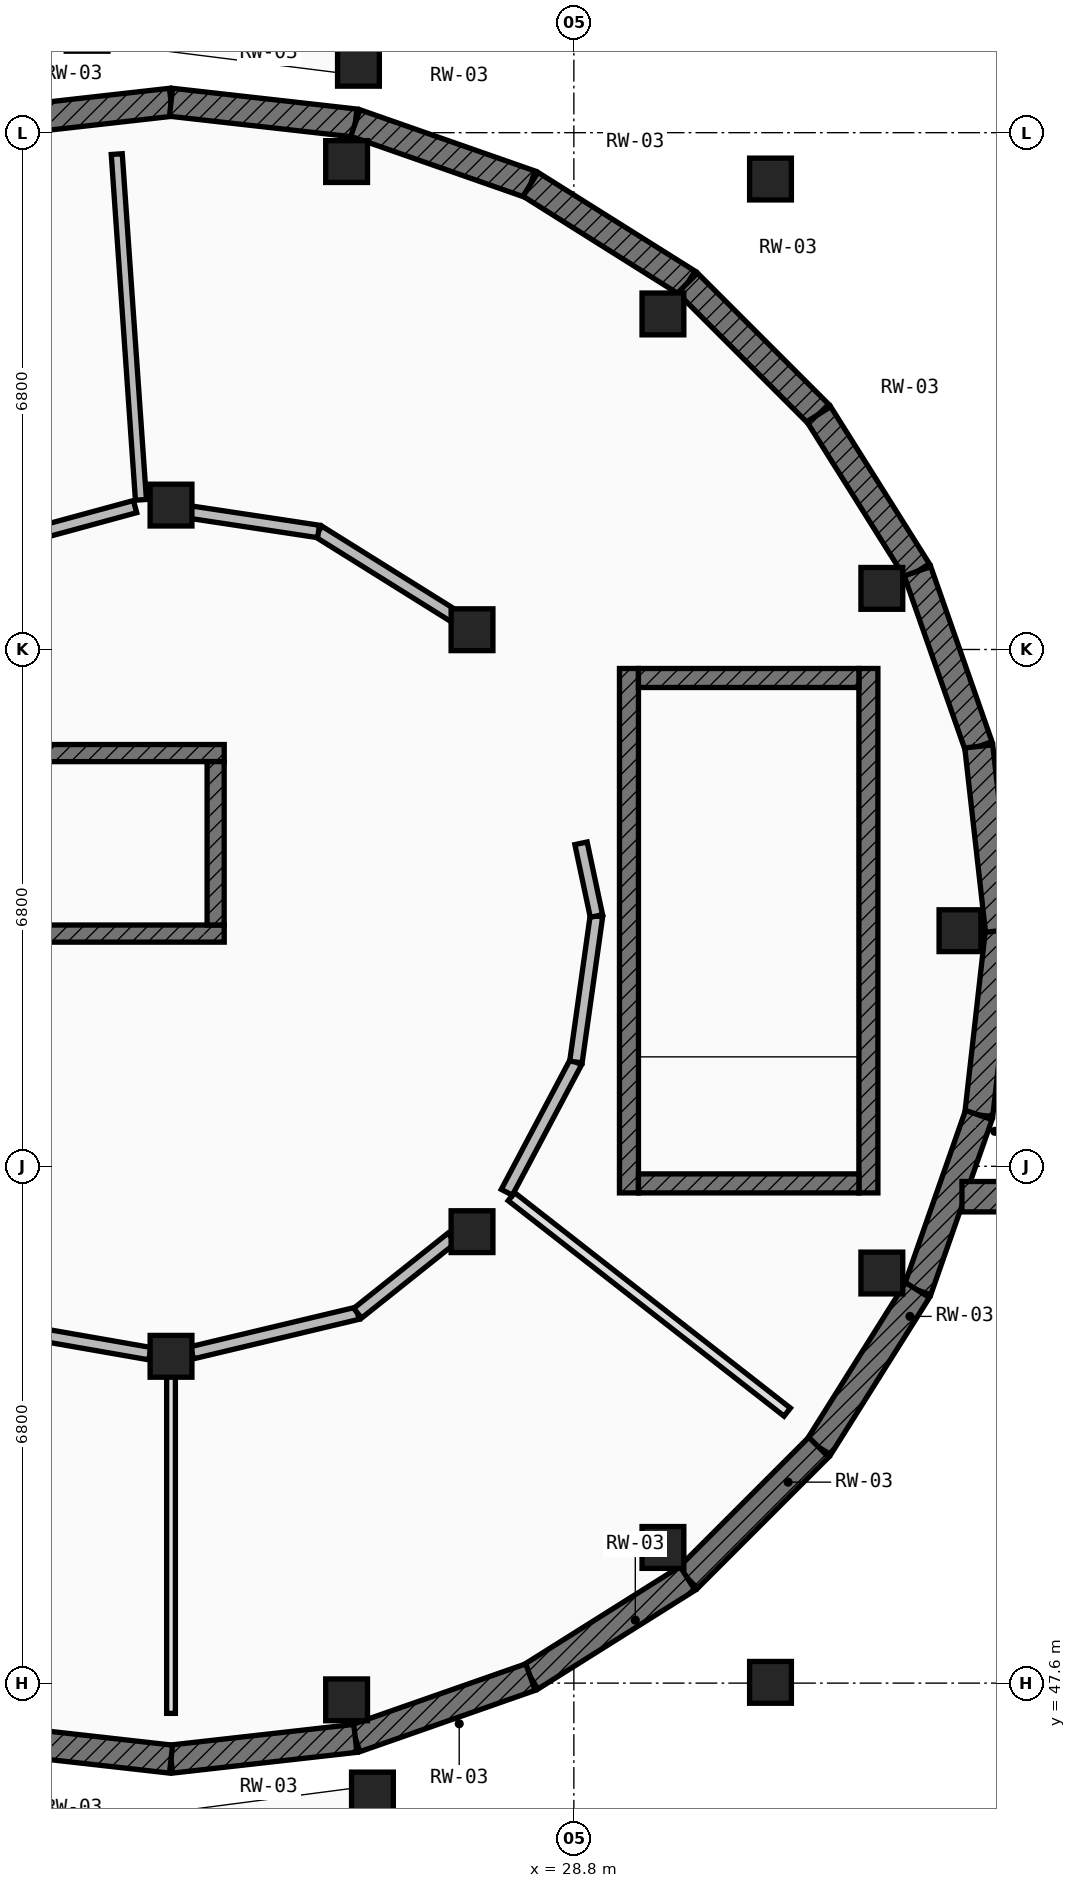
"""IFC4 building model, lengths in metres.
Left out: names, types, materials, properties, quantities, classifications, styles, units other than length and angle.
Written with IfcOpenShell. Run it as: python <this file> out.ifc"""

import sys

from ifc_helpers import new_model, si_unit, direction, frame, frame_2d, origin, origin_2d, place, context, subcontext, project, spatial, rectangle, extrude, element, fill, save


model = new_model("IFC4")
c1 = context("Model", 3, precision=1e-05, world=origin(), true_north=direction((0.0, 1.0)))
c2 = subcontext(c1, "Body", "Model", "MODEL_VIEW")
j1 = project(units=[si_unit("LENGTHUNIT", "METRE"), si_unit("PLANEANGLEUNIT", "RADIAN")], contexts=[c1])
p1 = place(None, origin())
s1 = spatial("IfcSite", under=j1, at=p1, CompositionType="ELEMENT")
p2 = place(p1, origin())
s2 = spatial("IfcBuilding", under=s1, at=p2, CompositionType="ELEMENT")
p3 = place(p2, frame((0.0, 0.0, -4.55)))
s3 = spatial("IfcBuildingStorey", under=s2, at=p3, CompositionType="ELEMENT", Elevation=-4.55)
for number, where, z_axis, x_axis in (
    (1, (33.88, 57.5, 0.0), (0.0, 0.0, 1.0), (1.0, 0.0, 0.0)),
    (2, (32.852, 62.004, 0.0), (0.0, 0.0, 1.0), (1.0, 0.0, 0.0)),
    (3, (29.972, 65.615, 0.0), (0.0, 0.0, 1.0), (1.0, 0.0, 0.0)),
    (4, (25.81, 67.62, 0.0), (0.0, 0.0, 1.0), (1.0, 0.0, 0.0)),
    (5, (25.81, 47.38, 0.0), (0.0, 0.0, 1.0), (1.0, 0.0, 0.0)),
    (6, (29.972, 49.385, 0.0), (0.0, 0.0, 1.0), (1.0, 0.0, 0.0)),
    (7, (32.852, 52.996, 0.0), (0.0, 0.0, 1.0), (1.0, 0.0, 0.0)),
    (8, (27.46, 61.46, 0.0), (0.0, 0.0, 1.0), (1.0, 0.0, 0.0)),
    (9, (23.5, 63.1, 0.0), (0.0, 0.0, 1.0), (1.0, 0.0, 0.0)),
    (10, (23.5, 51.9, 0.0), (0.0, 0.0, 1.0), (1.0, 0.0, 0.0)),
    (11, (27.46, 53.54, 0.0), (0.0, 0.0, 1.0), (1.0, 0.0, 0.0)),
    (12, (26.15, 46.154, 0.0), (0.0, 0.0, 1.0), (1.0, 0.0, 0.0)),
    (13, (25.966, 68.887, 0.0), (0.0, 0.0, 1.0), (1.0, 0.0, 0.0)),
):
    element("IfcColumn", number, at=place(p3, frame(where, z_axis=z_axis, x_axis=x_axis)), inside=s3, PredefinedType="COLUMN", context=c2, shape_type="SweptSolid", body=[
        extrude(rectangle(XDim=0.55, YDim=0.55, at=origin_2d()), origin(), (0.0, 0.0, 1.0), 4.55),
    ])
for number, where, z_axis, x_axis in (
    (14, (31.387, 67.39, 0.0), (0.0, 0.0, 1.0), (1.0, 0.0, 0.0)),
    (15, (31.387, 47.61, 0.0), (0.0, 0.0, 1.0), (1.0, 0.0, 0.0)),
):
    element("IfcColumn", number, at=place(p3, frame(where, z_axis=z_axis, x_axis=x_axis)), inside=s3, PredefinedType="COLUMN", context=c2, shape_type="SweptSolid", body=[
        extrude(rectangle(XDim=0.55, YDim=0.55, at=origin_2d()), origin(), (0.0, 0.0, 1.0), 5.7),
    ])
p4 = place(p3, frame((34.4, 57.5, 0.0), z_axis=(0.0, 0.0, 1.0), x_axis=(-0.111847873866, -0.993725340882, 0.0)))
e16 = element("IfcWall", 16, at=p4, inside=s3, PredefinedType="USERDEFINED", context=c2, shape_type="SweptSolid", body=[
    extrude(rectangle(XDim=2.44, YDim=0.37, at=frame_2d((1.22, 0.0))), origin(), (0.0, 0.0, 1.0), 3.335),
])
p5 = place(p3, frame((34.127, 55.075, 0.0), z_axis=(0.0, 0.0, 1.0), x_axis=(-0.330176659411, -0.943919156274, 0.0)))
e17 = element("IfcWall", 17, at=p5, inside=s3, PredefinedType="USERDEFINED", context=c2, shape_type="SweptSolid", body=[
    extrude(rectangle(XDim=2.441, YDim=0.37, at=frame_2d((1.22, 0.0))), origin(), (0.0, 0.0, 1.0), 3.335),
])
p6 = place(p3, frame((33.321, 52.771, 0.0), z_axis=(0.0, 0.0, 1.0), x_axis=(-0.532136726684, -0.846658434148, 0.0)))
e18 = element("IfcWall", 18, at=p6, inside=s3, PredefinedType="USERDEFINED", context=c2, shape_type="SweptSolid", body=[
    extrude(rectangle(XDim=2.441, YDim=0.37, at=frame_2d((1.221, 0.0))), origin(), (0.0, 0.0, 1.0), 3.335),
])
p7 = place(p3, frame((32.022, 50.704, 0.0), z_axis=(0.0, 0.0, 1.0), x_axis=(-0.707106781187, -0.707106781187, 0.0)))
e19 = element("IfcWall", 19, at=p7, inside=s3, PredefinedType="USERDEFINED", context=c2, shape_type="SweptSolid", body=[
    extrude(rectangle(XDim=2.441, YDim=0.37, at=frame_2d((1.22, 0.0))), origin(), (0.0, 0.0, 1.0), 3.335),
])
p8 = place(p3, frame((30.296, 48.978, 0.0), z_axis=(0.0, 0.0, 1.0), x_axis=(-0.846658434148, -0.532136726684, 0.0)))
e20 = element("IfcWall", 20, at=p8, inside=s3, PredefinedType="USERDEFINED", context=c2, shape_type="SweptSolid", body=[
    extrude(rectangle(XDim=2.441, YDim=0.37, at=frame_2d((1.221, 0.0))), origin(), (0.0, 0.0, 1.0), 3.335),
])
p9 = place(p3, frame((28.229, 47.679, 0.0), z_axis=(0.0, 0.0, 1.0), x_axis=(-0.943919156274, -0.330176659411, 0.0)))
e21 = element("IfcWall", 21, at=p9, inside=s3, PredefinedType="USERDEFINED", context=c2, shape_type="SweptSolid", body=[
    extrude(rectangle(XDim=2.441, YDim=0.37, at=frame_2d((1.22, 0.0))), origin(), (0.0, 0.0, 1.0), 3.335),
])
for number, where, z_axis, x_axis in (
    (22, (25.925, 46.873, 0.0), (0.0, 0.0, 1.0), (-0.994, -0.112, 0.0)),
    (23, (23.5, 46.6, 0.0), (0.0, 0.0, 1.0), (-0.994, 0.112, 0.0)),
    (24, (21.075, 68.127, 0.0), (0.0, 0.0, 1.0), (0.994, 0.112, 0.0)),
    (25, (23.5, 68.4, 0.0), (0.0, 0.0, 1.0), (0.994, -0.112, 0.0)),
):
    element("IfcWall", number, at=place(p3, frame(where, z_axis=z_axis, x_axis=x_axis)), inside=s3, PredefinedType="USERDEFINED", context=c2, shape_type="SweptSolid", body=[
        extrude(rectangle(XDim=2.44, YDim=0.37, at=frame_2d((1.22, 0.0))), origin(), (0.0, 0.0, 1.0), 3.335),
    ])
p10 = place(p3, frame((25.925, 68.127, 0.0), z_axis=(0.0, 0.0, 1.0), x_axis=(0.943919156274, -0.330176659411, 0.0)))
e26 = element("IfcWall", 26, at=p10, inside=s3, PredefinedType="USERDEFINED", context=c2, shape_type="SweptSolid", body=[
    extrude(rectangle(XDim=2.441, YDim=0.37, at=frame_2d((1.22, 0.0))), origin(), (0.0, 0.0, 1.0), 3.335),
])
p11 = place(p3, frame((28.229, 67.321, 0.0), z_axis=(0.0, 0.0, 1.0), x_axis=(0.846658434148, -0.532136726684, 0.0)))
e27 = element("IfcWall", 27, at=p11, inside=s3, PredefinedType="USERDEFINED", context=c2, shape_type="SweptSolid", body=[
    extrude(rectangle(XDim=2.441, YDim=0.37, at=frame_2d((1.221, 0.0))), origin(), (0.0, 0.0, 1.0), 3.335),
])
p12 = place(p3, frame((30.296, 66.022, 0.0), z_axis=(0.0, 0.0, 1.0), x_axis=(0.707106781187, -0.707106781187, 0.0)))
e28 = element("IfcWall", 28, at=p12, inside=s3, PredefinedType="USERDEFINED", context=c2, shape_type="SweptSolid", body=[
    extrude(rectangle(XDim=2.441, YDim=0.37, at=frame_2d((1.22, 0.0))), origin(), (0.0, 0.0, 1.0), 3.335),
])
p13 = place(p3, frame((32.022, 64.296, 0.0), z_axis=(0.0, 0.0, 1.0), x_axis=(0.532136726684, -0.846658434148, 0.0)))
e29 = element("IfcWall", 29, at=p13, inside=s3, PredefinedType="USERDEFINED", context=c2, shape_type="SweptSolid", body=[
    extrude(rectangle(XDim=2.441, YDim=0.37, at=frame_2d((1.221, 0.0))), origin(), (0.0, 0.0, 1.0), 3.335),
])
p14 = place(p3, frame((33.321, 62.229, 0.0), z_axis=(0.0, 0.0, 1.0), x_axis=(0.330176659411, -0.943919156274, 0.0)))
e30 = element("IfcWall", 30, at=p14, inside=s3, PredefinedType="USERDEFINED", context=c2, shape_type="SweptSolid", body=[
    extrude(rectangle(XDim=2.441, YDim=0.37, at=frame_2d((1.22, 0.0))), origin(), (0.0, 0.0, 1.0), 3.335),
])
p15 = place(p3, frame((34.127, 59.925, 0.0), z_axis=(0.0, 0.0, 1.0), x_axis=(0.111847873866, -0.993725340882, 0.0)))
e31 = element("IfcWall", 31, at=p15, inside=s3, PredefinedType="USERDEFINED", context=c2, shape_type="SweptSolid", body=[
    extrude(rectangle(XDim=2.44, YDim=0.37, at=frame_2d((1.22, 0.0))), origin(), (0.0, 0.0, 1.0), 3.335),
])
p16 = place(p3, frame((33.906, 54.0, 0.0), z_axis=(0.0, 0.0, 1.0), x_axis=(1.0, 0.0, 0.0)))
e32 = element("IfcWall", 32, at=p16, inside=s3, PredefinedType="USERDEFINED", context=c2, shape_type="SweptSolid", body=[
    extrude(rectangle(XDim=5.27, YDim=0.4, at=frame_2d((2.635, 0.0))), origin(), (0.0, 0.0, 1.0), 6.68),
])
p17 = place(p3, frame((29.525, 60.95, 0.0), z_axis=(0.0, 0.0, 1.0), x_axis=(0.0, -1.0, 0.0)))
e33 = element("IfcWall", 33, at=p17, inside=s3, PredefinedType="SHEAR", context=c2, shape_type="SweptSolid", body=[
    extrude(rectangle(XDim=6.9, YDim=0.25, at=frame_2d((3.45, 0.0))), origin(), (0.0, 0.0, 1.0), 4.135),
])
p18 = place(p17, frame((0.43, 0.0, 0.0)))
e34 = element("IfcOpeningElement", 34, at=p18, cuts=e33, PredefinedType="OPENING", context=c2, shape_type="SweptSolid", body=[
    extrude(rectangle(XDim=1.1, YDim=2.15, at=frame_2d((0.55, 1.075))), frame((0.0, 0.135, 0.0), z_axis=(0.0, -1.0, 0.0), x_axis=(1.0, 0.0, 0.0)), (0.0, 0.0, 1.0), 0.27),
])
p19 = place(p3, frame((32.675, 60.95, 0.0), z_axis=(0.0, 0.0, 1.0), x_axis=(0.0, -1.0, 0.0)))
e35 = element("IfcWall", 35, at=p19, inside=s3, PredefinedType="SHEAR", context=c2, shape_type="SweptSolid", body=[
    extrude(rectangle(XDim=6.9, YDim=0.25, at=frame_2d((3.45, 0.0))), origin(), (0.0, 0.0, 1.0), 4.135),
])
for number, where, z_axis, x_axis in (
    (36, (29.65, 60.825, 0.0), (0.0, 0.0, 1.0), (1.0, 0.0, 0.0)),
    (37, (29.65, 54.175, 0.0), (0.0, 0.0, 1.0), (1.0, 0.0, 0.0)),
):
    element("IfcWall", number, at=place(p3, frame(where, z_axis=z_axis, x_axis=x_axis)), inside=s3, PredefinedType="SHEAR", context=c2, shape_type="SweptSolid", body=[
        extrude(rectangle(XDim=2.9, YDim=0.25, at=frame_2d((1.45, 0.0))), origin(), (0.0, 0.0, 1.0), 4.135),
    ])
p20 = place(p3, frame((21.1, 57.462, 0.0), z_axis=(0.0, 0.0, 1.0), x_axis=(1.0, 0.0, 0.0)))
e38 = element("IfcWall", 38, at=p20, inside=s3, PredefinedType="SHEAR", context=c2, shape_type="SweptSolid", body=[
    extrude(rectangle(XDim=3.1, YDim=0.225, at=frame_2d((1.55, 0.0))), origin(), (0.0, 0.0, 1.0), 4.135),
])
p21 = place(p20, frame((0.95, 0.0, 0.0)))
e39 = element("IfcOpeningElement", 39, at=p21, cuts=e38, PredefinedType="OPENING", context=c2, shape_type="SweptSolid", body=[
    extrude(rectangle(XDim=1.2, YDim=2.2, at=frame_2d((0.6, 1.1))), frame((0.0, 0.123, 0.0), z_axis=(0.0, -1.0, 0.0), x_axis=(1.0, 0.0, 0.0)), (0.0, 0.0, 1.0), 0.245),
])
p22 = place(p3, frame((21.1, 59.837, 0.0), z_axis=(0.0, 0.0, 1.0), x_axis=(1.0, 0.0, 0.0)))
e40 = element("IfcWall", 40, at=p22, inside=s3, PredefinedType="SHEAR", context=c2, shape_type="SweptSolid", body=[
    extrude(rectangle(XDim=3.1, YDim=0.225, at=frame_2d((1.55, 0.0))), origin(), (0.0, 0.0, 1.0), 4.135),
])
p23 = place(p3, frame((24.087, 57.575, 0.0), z_axis=(0.0, 0.0, 1.0), x_axis=(0.0, 1.0, 0.0)))
e41 = element("IfcWall", 41, at=p23, inside=s3, PredefinedType="SHEAR", context=c2, shape_type="SweptSolid", body=[
    extrude(rectangle(XDim=2.15, YDim=0.225, at=frame_2d((1.075, 0.0))), origin(), (0.0, 0.0, 1.0), 4.135),
])
p24 = place(p3, frame((23.104, 63.169, 0.0), z_axis=(0.0, 0.0, 1.0), x_axis=(-0.069759335413, 0.997563850148, 0.0)))
e42 = element("IfcWall", 42, at=p24, inside=s3, PredefinedType="PARTITIONING", context=c2, shape_type="SweptSolid", body=[
    extrude(rectangle(XDim=4.56, YDim=0.145, at=frame_2d((2.28, 0.0))), origin(), (0.0, 0.0, 1.0), 3.31),
])
p25 = place(p3, frame((23.5, 51.817, 0.0), z_axis=(0.0, 0.0, 1.0), x_axis=(0.0, -1.0, 0.0)))
e43 = element("IfcWall", 43, at=p25, inside=s3, PredefinedType="PARTITIONING", context=c2, shape_type="SweptSolid", body=[
    extrude(rectangle(XDim=4.615, YDim=0.115, at=frame_2d((2.308, 0.0))), origin(), (0.0, 0.0, 1.0), 3.31),
])
p26 = place(p3, frame((27.978, 54.001, 0.0), z_axis=(0.0, 0.0, 1.0), x_axis=(0.788037233831, -0.615627580681, 0.0)))
e44 = element("IfcWall", 44, at=p26, inside=s3, PredefinedType="PLUMBINGWALL", context=c2, shape_type="SweptSolid", body=[
    extrude(rectangle(XDim=4.605, YDim=0.135, at=frame_2d((2.302, 0.0))), origin(), (0.0, 0.0, 1.0), 3.31),
])
p27 = place(p3, frame((27.238, 61.63, 0.0), z_axis=(0.0, 0.0, 1.0), x_axis=(-0.848030663633, 0.529947161081, 0.0)))
e45 = element("IfcWall", 45, at=p27, inside=s3, PredefinedType="PARTITIONING", context=c2, shape_type="SweptSolid", body=[
    extrude(rectangle(XDim=2.119, YDim=0.165, at=frame_2d((1.06, 0.0))), origin(), (0.0, 0.0, 1.0), 3.31),
])
p28 = place(p27, frame((0.469, 0.0, 0.0)))
e46 = element("IfcOpeningElement", 46, at=p28, cuts=e45, PredefinedType="OPENING", context=c2, shape_type="SweptSolid", body=[
    extrude(rectangle(XDim=1.18, YDim=2.2, at=frame_2d((0.59, 1.1))), frame((0.0, 0.093, 0.0), z_axis=(0.0, -1.0, 0.0), x_axis=(1.0, 0.0, 0.0)), (0.0, 0.0, 1.0), 0.185),
])
p29 = place(p3, frame((25.441, 62.753, 0.0), z_axis=(0.0, 0.0, 1.0), x_axis=(-0.988808298797, 0.149191649331, 0.0)))
e47 = element("IfcWall", 47, at=p29, inside=s3, PredefinedType="PARTITIONING", context=c2, shape_type="SweptSolid", body=[
    extrude(rectangle(XDim=1.697, YDim=0.165, at=frame_2d((0.849, 0.0))), origin(), (0.0, 0.0, 1.0), 3.31),
])
p30 = place(p3, frame((23.027, 63.08, 0.0), z_axis=(0.0, 0.0, 1.0), x_axis=(-0.964919932979, -0.262544325667, 0.0)))
e48 = element("IfcWall", 48, at=p30, inside=s3, PredefinedType="PARTITIONING", context=c2, shape_type="SweptSolid", body=[
    extrude(rectangle(XDim=2.019, YDim=0.165, at=frame_2d((1.009, 0.0))), origin(), (0.0, 0.0, 1.0), 3.31),
])
p31 = place(p30, frame((0.389, 0.0, 0.0)))
e49 = element("IfcOpeningElement", 49, at=p31, cuts=e48, PredefinedType="OPENING", context=c2, shape_type="SweptSolid", body=[
    extrude(rectangle(XDim=1.24, YDim=2.22, at=frame_2d((0.62, 1.11))), frame((0.0, 0.093, 0.0), z_axis=(0.0, -1.0, 0.0), x_axis=(1.0, 0.0, 0.0)), (0.0, 0.0, 1.0), 0.185),
])
p32 = place(p3, frame((21.681, 52.204, 0.0), z_axis=(0.0, 0.0, 1.0), x_axis=(0.985099289187, -0.171986599601, 0.0)))
e50 = element("IfcWall", 50, at=p32, inside=s3, PredefinedType="PARTITIONING", context=c2, shape_type="SweptSolid", body=[
    extrude(rectangle(XDim=1.564, YDim=0.165, at=frame_2d((0.782, 0.0))), origin(), (0.0, 0.0, 1.0), 3.31),
])
p33 = place(p3, frame((23.776, 51.947, 0.0), z_axis=(0.0, 0.0, 1.0), x_axis=(0.972689167377, 0.232111575903, 0.0)))
e51 = element("IfcWall", 51, at=p33, inside=s3, PredefinedType="PARTITIONING", context=c2, shape_type="SweptSolid", body=[
    extrude(rectangle(XDim=2.24, YDim=0.165, at=frame_2d((1.12, 0.0))), origin(), (0.0, 0.0, 1.0), 3.31),
])
p34 = place(p33, frame((0.68, 0.0, 0.0)))
e52 = element("IfcOpeningElement", 52, at=p34, cuts=e51, PredefinedType="OPENING", context=c2, shape_type="SweptSolid", body=[
    extrude(rectangle(XDim=0.88, YDim=2.1, at=frame_2d((0.44, 1.05))), frame((0.0, 0.093, 0.0), z_axis=(0.0, -1.0, 0.0), x_axis=(1.0, 0.0, 0.0)), (0.0, 0.0, 1.0), 0.185),
])
p35 = place(p3, frame((25.955, 52.467, 0.0), z_axis=(0.0, 0.0, 1.0), x_axis=(0.781844808281, 0.623473091451, 0.0)))
e53 = element("IfcWall", 53, at=p35, inside=s3, PredefinedType="PARTITIONING", context=c2, shape_type="SweptSolid", body=[
    extrude(rectangle(XDim=1.585, YDim=0.165, at=frame_2d((0.792, 0.0))), origin(), (0.0, 0.0, 1.0), 3.31),
])
p36 = place(p3, frame((27.918, 54.058, 0.0), z_axis=(0.0, 0.0, 1.0), x_axis=(0.46852941816, 0.883447895644, 0.0)))
e54 = element("IfcWall", 54, at=p36, inside=s3, PredefinedType="PARTITIONING", context=c2, shape_type="SweptSolid", body=[
    extrude(rectangle(XDim=1.94, YDim=0.165, at=frame_2d((0.97, 0.0))), origin(), (0.0, 0.0, 1.0), 3.31),
])
p37 = place(p36, frame((0.48, 0.0, 0.0)))
e55 = element("IfcOpeningElement", 55, at=p37, cuts=e54, PredefinedType="OPENING", context=c2, shape_type="SweptSolid", body=[
    extrude(rectangle(XDim=0.98, YDim=2.1, at=frame_2d((0.49, 1.05))), frame((0.0, 0.093, 0.0), z_axis=(0.0, -1.0, 0.0), x_axis=(1.0, 0.0, 0.0)), (0.0, 0.0, 1.0), 0.185),
])
p38 = place(p3, frame((28.827, 55.772, 0.0), z_axis=(0.0, 0.0, 1.0), x_axis=(0.139183488293, 0.990266608842, 0.0)))
e56 = element("IfcWall", 56, at=p38, inside=s3, PredefinedType="PARTITIONING", context=c2, shape_type="SweptSolid", body=[
    extrude(rectangle(XDim=1.94, YDim=0.165, at=frame_2d((0.97, 0.0))), origin(), (0.0, 0.0, 1.0), 3.31),
])
p39 = place(p3, frame((29.097, 57.693, 0.0), z_axis=(0.0, 0.0, 1.0), x_axis=(-0.20743182321, 0.978249476729, 0.0)))
e57 = element("IfcWall", 57, at=p39, inside=s3, PredefinedType="PARTITIONING", context=c2, shape_type="SweptSolid", body=[
    extrude(rectangle(XDim=0.978, YDim=0.165, at=frame_2d((0.489, 0.0))), origin(), (0.0, 0.0, 1.0), 3.31),
])
p40 = place(p18, origin())
e58 = element("IfcDoor", 58, at=p40, inside=s3, OperationType="SINGLE_SWING_LEFT", PredefinedType="DOOR", context=c2, shape_type="SweptSolid", body=[
    extrude(rectangle(XDim=1.1, YDim=2.15, at=frame_2d((0.55, 1.075))), frame((0.0, 0.025, 0.0), z_axis=(0.0, -1.0, 0.0), x_axis=(1.0, 0.0, 0.0)), (0.0, 0.0, 1.0), 0.05),
])
fill(e34, e58)
p41 = place(p21, origin())
e59 = element("IfcDoor", 59, at=p41, inside=s3, OperationType="DOUBLE_DOOR_SLIDING", PredefinedType="DOOR", context=c2, shape_type="SweptSolid", body=[
    extrude(rectangle(XDim=1.2, YDim=2.2, at=frame_2d((0.6, 1.1))), frame((0.0, 0.025, 0.0), z_axis=(0.0, -1.0, 0.0), x_axis=(1.0, 0.0, 0.0)), (0.0, 0.0, 1.0), 0.05),
])
fill(e39, e59)
p42 = place(p28, origin())
e60 = element("IfcDoor", 60, at=p42, inside=s3, OperationType="SINGLE_SWING_RIGHT", PredefinedType="DOOR", context=c2, shape_type="SweptSolid", body=[
    extrude(rectangle(XDim=1.18, YDim=2.2, at=frame_2d((0.59, 1.1))), frame((0.0, 0.025, 0.0), z_axis=(0.0, -1.0, 0.0), x_axis=(1.0, 0.0, 0.0)), (0.0, 0.0, 1.0), 0.05),
])
fill(e46, e60)
p43 = place(p31, origin())
e61 = element("IfcDoor", 61, at=p43, inside=s3, OperationType="SINGLE_SWING_LEFT", PredefinedType="DOOR", context=c2, shape_type="SweptSolid", body=[
    extrude(rectangle(XDim=1.24, YDim=2.22, at=frame_2d((0.62, 1.11))), frame((0.0, 0.025, 0.0), z_axis=(0.0, -1.0, 0.0), x_axis=(1.0, 0.0, 0.0)), (0.0, 0.0, 1.0), 0.05),
])
fill(e49, e61)
p44 = place(p34, origin())
e62 = element("IfcDoor", 62, at=p44, inside=s3, OperationType="SINGLE_SWING_LEFT", PredefinedType="DOOR", context=c2, shape_type="SweptSolid", body=[
    extrude(rectangle(XDim=0.88, YDim=2.1, at=frame_2d((0.44, 1.05))), frame((0.0, 0.025, 0.0), z_axis=(0.0, -1.0, 0.0), x_axis=(1.0, 0.0, 0.0)), (0.0, 0.0, 1.0), 0.05),
])
fill(e52, e62)
p45 = place(p37, origin())
e63 = element("IfcDoor", 63, at=p45, inside=s3, OperationType="SINGLE_SWING_RIGHT", PredefinedType="DOOR", context=c2, shape_type="SweptSolid", body=[
    extrude(rectangle(XDim=0.98, YDim=2.1, at=frame_2d((0.49, 1.05))), frame((0.0, 0.025, 0.0), z_axis=(0.0, -1.0, 0.0), x_axis=(1.0, 0.0, 0.0)), (0.0, 0.0, 1.0), 0.05),
])
fill(e55, e63)
save(model, sys.argv[1])
